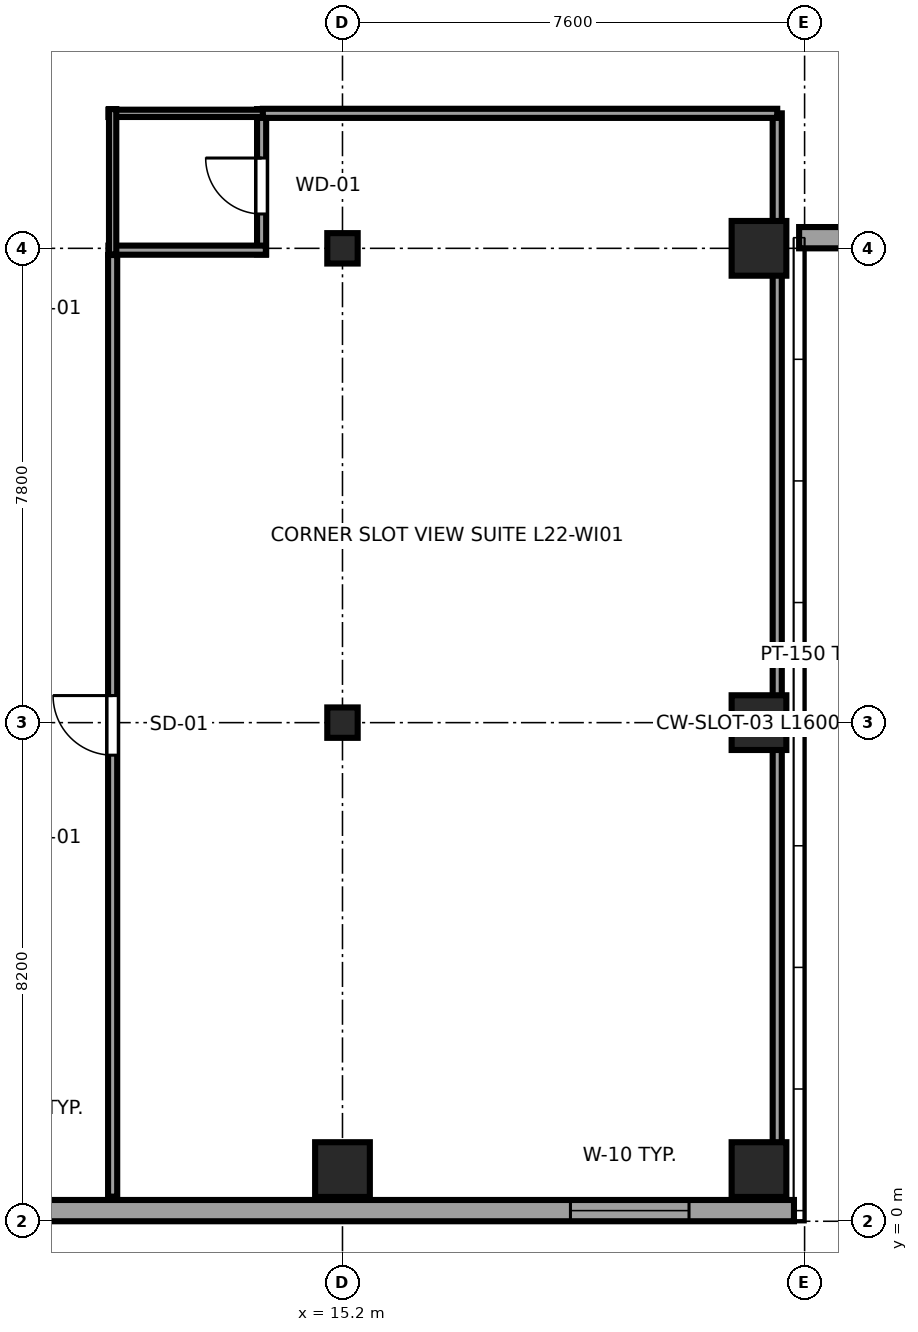
"""IFC4 building model, lengths in metres.
Left out: names, types, materials, properties, quantities, classifications, styles, units other than length and angle.
Written with IfcOpenShell. Run it as: python <this file> out.ifc"""

import sys

from ifc_helpers import new_model, si_unit, direction, frame, frame_2d, origin, origin_2d, place, context, subcontext, project, spatial, rectangle, i_section, extrude, source, transform, mapped, element, fill, save


model = new_model("IFC4")
c1 = context("Model", 3, precision=1e-05, world=origin(), true_north=direction((0.0, 1.0)))
c2 = subcontext(c1, "Body", "Model", "MODEL_VIEW")
j1 = project(units=[si_unit("LENGTHUNIT", "METRE"), si_unit("PLANEANGLEUNIT", "RADIAN")], contexts=[c1])
p1 = place(None, origin())
s1 = spatial("IfcSite", under=j1, at=p1, CompositionType="ELEMENT")
p2 = place(p1, origin())
s2 = spatial("IfcBuilding", under=s1, at=p2, CompositionType="ELEMENT")
p3 = place(p2, frame((0.0, 0.0, 88.8)))
s3 = spatial("IfcBuildingStorey", under=s2, at=p3, CompositionType="ELEMENT", Elevation=88.8)
m1 = source(origin(), c2, "Body", "SweptSolid", [
    extrude(rectangle(XDim=0.9, YDim=0.9, at=origin_2d()), origin(), (0.0, 0.0, 1.0), 3.55),
])
p4 = place(p3, frame((15.2, 0.85, 0.0), z_axis=(0.0, 0.0, 1.0), x_axis=(1.0, 0.0, 0.0)))
e1 = element("IfcColumn", 1, at=p4, inside=s3, PredefinedType="COLUMN", context=c2, shape_type="MappedRepresentation", body=[
    mapped(m1, transform((0.0, 0.0, 0.0), x_axis=(1.0, 0.0, 0.0), y_axis=(0.0, 1.0, 0.0), z_axis=(0.0, 0.0, 1.0), scale=1.0)),
])
m2 = source(origin(), c2, "Body", "SweptSolid", [
    extrude(i_section(OverallWidth=0.5, OverallDepth=0.5, WebThickness=0.022, FlangeThickness=0.034, at=origin_2d()), origin(), (0.0, 0.0, 1.0), 3.55),
])
for number, where, z_axis, x_axis in (
    (2, (15.2, 8.2, 0.0), (0.0, 0.0, 1.0), (1.0, 0.0, 0.0)),
    (3, (15.2, 16.0, 0.0), (0.0, 0.0, 1.0), (1.0, 0.0, 0.0)),
):
    element("IfcColumn", number, at=place(p3, frame(where, z_axis=z_axis, x_axis=x_axis)), inside=s3, PredefinedType="COLUMN", context=c2, shape_type="MappedRepresentation", body=[
        mapped(m2, transform((0.0, 0.0, 0.0), x_axis=(1.0, 0.0, 0.0), y_axis=(0.0, 1.0, 0.0), z_axis=(0.0, 0.0, 1.0), scale=1.0)),
    ])
for number, where, z_axis, x_axis in (
    (4, (22.05, 0.85, 0.0), (0.0, 0.0, 1.0), (1.0, 0.0, 0.0)),
    (5, (22.05, 8.2, 0.0), (0.0, 0.0, 1.0), (1.0, 0.0, 0.0)),
    (6, (22.05, 16.0, 0.0), (0.0, 0.0, 1.0), (1.0, 0.0, 0.0)),
):
    element("IfcColumn", number, at=place(p3, frame(where, z_axis=z_axis, x_axis=x_axis)), inside=s3, PredefinedType="COLUMN", context=c2, shape_type="MappedRepresentation", body=[
        mapped(m1, transform((0.0, 0.0, 0.0), x_axis=(1.0, 0.0, 0.0), y_axis=(0.0, 1.0, 0.0), z_axis=(0.0, 0.0, 1.0), scale=1.0)),
    ])
p5 = place(p3, frame((4.617, 0.175, 0.0), z_axis=(0.0, 0.0, 1.0), x_axis=(1.0, 0.0, 0.0)))
e7 = element("IfcWall", 7, at=p5, inside=s3, PredefinedType="SOLIDWALL", context=c2, shape_type="SweptSolid", body=[
    extrude(rectangle(XDim=18.008, YDim=0.35, at=frame_2d((9.004, 0.0))), origin(), (0.0, 0.0, 1.0), 3.37),
])
p6 = place(p5, frame((14.332, 0.0, 0.68)))
e8 = element("IfcOpeningElement", 8, at=p6, cuts=e7, PredefinedType="OPENING", context=c2, shape_type="SweptSolid", body=[
    extrude(rectangle(XDim=1.95, YDim=1.82, at=frame_2d((0.975, 0.91))), frame((0.0, 0.185, 0.0), z_axis=(0.0, -1.0, 0.0), x_axis=(1.0, 0.0, 0.0)), (0.0, 0.0, 1.0), 0.37),
])
p7 = place(p3, frame((22.71, 16.175, 0.0), z_axis=(0.0, 0.0, 1.0), x_axis=(1.0, 0.0, 0.0)))
e9 = element("IfcWall", 9, at=p7, inside=s3, PredefinedType="SOLIDWALL", context=c2, shape_type="SweptSolid", body=[
    extrude(rectangle(XDim=11.58, YDim=0.35, at=frame_2d((5.79, 0.0))), origin(), (0.0, 0.0, 1.0), 2.748),
])
p8 = place(p7, frame((2.22, 0.0, 0.68)))
e10 = element("IfcOpeningElement", 10, at=p8, cuts=e9, PredefinedType="OPENING", context=c2, shape_type="SweptSolid", body=[
    extrude(rectangle(XDim=1.95, YDim=1.82, at=frame_2d((0.975, 0.91))), frame((0.0, 0.185, 0.0), z_axis=(0.0, -1.0, 0.0), x_axis=(1.0, 0.0, 0.0)), (0.0, 0.0, 1.0), 0.37),
])
p9 = place(p7, frame((7.41, 0.0, 0.68)))
e11 = element("IfcOpeningElement", 11, at=p9, cuts=e9, PredefinedType="OPENING", context=c2, shape_type="SweptSolid", body=[
    extrude(rectangle(XDim=1.95, YDim=1.82, at=frame_2d((0.975, 0.91))), frame((0.0, 0.185, 0.0), z_axis=(0.0, -1.0, 0.0), x_axis=(1.0, 0.0, 0.0)), (0.0, 0.0, 1.0), 0.37),
])
p10 = place(p3, frame((13.87, 15.9, 0.0), z_axis=(0.0, 0.0, 1.0), x_axis=(0.0, 1.0, 0.0)))
e12 = element("IfcWall", 12, at=p10, inside=s3, PredefinedType="PARTITIONING", context=c2, shape_type="SweptSolid", body=[
    extrude(rectangle(XDim=2.39, YDim=0.15, at=frame_2d((1.195, 0.0))), origin(), (0.0, 0.0, 1.0), 3.37),
])
p11 = place(p10, frame((0.665, 0.0, 0.0)))
e13 = element("IfcOpeningElement", 13, at=p11, cuts=e12, PredefinedType="OPENING", context=c2, shape_type="SweptSolid", body=[
    extrude(rectangle(XDim=0.92, YDim=2.01, at=frame_2d((0.46, 1.005))), frame((0.0, 0.085, 0.0), z_axis=(0.0, -1.0, 0.0), x_axis=(1.0, 0.0, 0.0)), (0.0, 0.0, 1.0), 0.17),
])
p12 = place(p3, frame((11.35, 15.97, 0.0), z_axis=(0.0, 0.0, 1.0), x_axis=(1.0, 0.0, 0.0)))
e14 = element("IfcWall", 14, at=p12, inside=s3, PredefinedType="PARTITIONING", context=c2, shape_type="SweptSolid", body=[
    extrude(rectangle(XDim=2.59, YDim=0.15, at=frame_2d((1.295, 0.0))), origin(), (0.0, 0.0, 1.0), 2.748),
])
p13 = place(p3, frame((11.35, 18.22, 0.0), z_axis=(0.0, 0.0, 1.0), x_axis=(1.0, 0.0, 0.0)))
e15 = element("IfcWall", 15, at=p13, inside=s3, PredefinedType="PLUMBINGWALL", context=c2, shape_type="SweptSolid", body=[
    extrude(rectangle(XDim=2.59, YDim=0.12, at=frame_2d((1.295, 0.0))), origin(), (0.0, 0.0, 1.0), 3.37),
])
p14 = place(p3, frame((11.42, 15.9, 0.0), z_axis=(0.0, 0.0, 1.0), x_axis=(0.0, 1.0, 0.0)))
e16 = element("IfcWall", 16, at=p14, inside=s3, PredefinedType="PLUMBINGWALL", context=c2, shape_type="SweptSolid", body=[
    extrude(rectangle(XDim=2.39, YDim=0.12, at=frame_2d((1.195, 0.0))), origin(), (0.0, 0.0, 1.0), 2.954),
])
p15 = place(p3, frame((11.42, 0.405, 0.0), z_axis=(0.0, 0.0, 1.0), x_axis=(0.0, 1.0, 0.0)))
e17 = element("IfcWall", 17, at=p15, inside=s3, PredefinedType="PARTITIONING", context=c2, shape_type="SweptSolid", body=[
    extrude(rectangle(XDim=15.485, YDim=0.15, at=frame_2d((7.742, 0.0))), origin(), (0.0, 0.0, 1.0), 2.954),
])
p16 = place(p15, frame((7.26, 0.0, 0.0)))
e18 = element("IfcOpeningElement", 18, at=p16, cuts=e17, PredefinedType="OPENING", context=c2, shape_type="SweptSolid", body=[
    extrude(rectangle(XDim=0.98, YDim=2.12, at=frame_2d((0.49, 1.06))), frame((0.0, 0.085, 0.0), z_axis=(0.0, -1.0, 0.0), x_axis=(1.0, 0.0, 0.0)), (0.0, 0.0, 1.0), 0.17),
])
p17 = place(p3, frame((22.35, 0.405, 0.0), z_axis=(0.0, 0.0, 1.0), x_axis=(0.0, 1.0, 0.0)))
e19 = element("IfcWall", 19, at=p17, inside=s3, PredefinedType="PARTITIONING", context=c2, shape_type="SweptSolid", body=[
    extrude(rectangle(XDim=17.815, YDim=0.15, at=frame_2d((8.907, 0.0))), origin(), (0.0, 0.0, 1.0), 3.37),
])
p18 = place(p3, frame((13.89, 18.22, 0.0), z_axis=(0.0, 0.0, 1.0), x_axis=(1.0, 0.0, 0.0)))
e20 = element("IfcWall", 20, at=p18, inside=s3, PredefinedType="PARTITIONING", context=c2, shape_type="SweptSolid", body=[
    extrude(rectangle(XDim=8.46, YDim=0.15, at=frame_2d((4.23, 0.0))), origin(), (0.0, 0.0, 1.0), 3.37),
])
m3 = source(origin(), c2, "Body", "SweptSolid", [
    extrude(rectangle(XDim=1.95, YDim=1.82, at=frame_2d((0.975, 0.91))), frame((0.0, 0.09, 0.0), z_axis=(0.0, -1.0, 0.0), x_axis=(1.0, 0.0, 0.0)), (0.0, 0.0, 1.0), 0.06),
])
p19 = place(p6, origin())
e21 = element("IfcWindow", 21, at=p19, inside=s3, PartitioningType="DOUBLE_PANEL_VERTICAL", PredefinedType="WINDOW", context=c2, shape_type="MappedRepresentation", body=[
    mapped(m3, transform((0.0, 0.0, 0.0), x_axis=(1.0, 0.0, 0.0), y_axis=(0.0, 1.0, 0.0), z_axis=(0.0, 0.0, 1.0), scale=1.0)),
])
fill(e8, e21)
m4 = source(origin(), c2, "Body", "SweptSolid", [
    extrude(rectangle(XDim=0.92, YDim=2.01, at=frame_2d((0.46, 1.005))), frame((0.0, 0.025, 0.0), z_axis=(0.0, -1.0, 0.0), x_axis=(1.0, 0.0, 0.0)), (0.0, 0.0, 1.0), 0.05),
])
p20 = place(p11, origin())
e22 = element("IfcDoor", 22, at=p20, inside=s3, OperationType="SINGLE_SWING_RIGHT", PredefinedType="DOOR", context=c2, shape_type="MappedRepresentation", body=[
    mapped(m4, transform((0.0, 0.0, 0.0), x_axis=(1.0, 0.0, 0.0), y_axis=(0.0, 1.0, 0.0), z_axis=(0.0, 0.0, 1.0), scale=1.0)),
])
fill(e13, e22)
m5 = source(origin(), c2, "Body", "SweptSolid", [
    extrude(rectangle(XDim=0.98, YDim=2.12, at=frame_2d((0.49, 1.06))), frame((0.0, 0.025, 0.0), z_axis=(0.0, -1.0, 0.0), x_axis=(1.0, 0.0, 0.0)), (0.0, 0.0, 1.0), 0.05),
])
p21 = place(p16, origin())
e23 = element("IfcDoor", 23, at=p21, inside=s3, OperationType="SINGLE_SWING_RIGHT", PredefinedType="DOOR", context=c2, shape_type="MappedRepresentation", body=[
    mapped(m5, transform((0.0, 0.0, 0.0), x_axis=(1.0, 0.0, 0.0), y_axis=(0.0, 1.0, 0.0), z_axis=(0.0, 0.0, 1.0), scale=1.0)),
])
fill(e18, e23)
save(model, sys.argv[1])
